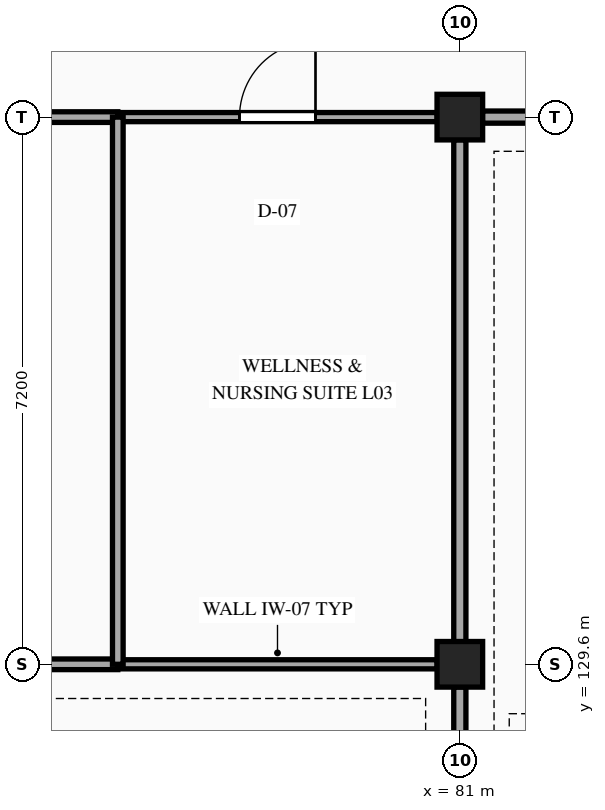
"""IFC4 building model, lengths in metres.
Left out: names, types, materials, properties, quantities, classifications, styles, units other than length and angle.
Written with IfcOpenShell. Run it as: python <this file> out.ifc"""

import sys

from ifc_helpers import new_model, si_unit, direction, frame, frame_2d, origin, origin_2d, place, context, subcontext, project, spatial, rectangle, extrude, element, fill, save


model = new_model("IFC4")
c1 = context("Model", 3, precision=1e-05, world=origin(), true_north=direction((0.0, 1.0)))
c2 = subcontext(c1, "Body", "Model", "MODEL_VIEW")
j1 = project(units=[si_unit("LENGTHUNIT", "METRE"), si_unit("PLANEANGLEUNIT", "RADIAN")], contexts=[c1])
p1 = place(None, origin())
s1 = spatial("IfcSite", under=j1, at=p1, CompositionType="ELEMENT")
p2 = place(p1, origin())
s2 = spatial("IfcBuilding", under=s1, at=p2, CompositionType="ELEMENT")
p3 = place(p2, frame((0.0, 0.0, 15.3)))
s3 = spatial("IfcBuildingStorey", under=s2, at=p3, CompositionType="ELEMENT", Elevation=15.3)
for number, where, z_axis, x_axis in (
    (1, (81.0, 129.6, 0.0), (0.0, 0.0, 1.0), (1.0, 0.0, 0.0)),
    (2, (81.0, 136.8, 0.0), (0.0, 0.0, 1.0), (1.0, 0.0, 0.0)),
):
    element("IfcColumn", number, at=place(p3, frame(where, z_axis=z_axis, x_axis=x_axis)), inside=s3, PredefinedType="COLUMN", context=c2, shape_type="SweptSolid", body=[
        extrude(rectangle(XDim=0.6, YDim=0.6, at=origin_2d()), origin(), (0.0, 0.0, 1.0), 4.5),
    ])
p4 = place(p3, frame((72.298, 129.6, 0.0), z_axis=(0.0, 0.0, 1.0), x_axis=(1.0, 0.0, 0.0)))
e3 = element("IfcWall", 3, at=p4, inside=s3, PredefinedType="PARTITIONING", context=c2, shape_type="SweptSolid", body=[
    extrude(rectangle(XDim=4.202, YDim=0.14, at=frame_2d((2.101, 0.0))), origin(), (0.0, 0.0, 1.0), 3.638),
])
p5 = place(p3, frame((76.5, 129.6, 0.0), z_axis=(0.0, 0.0, 1.0), x_axis=(1.0, 0.0, 0.0)))
e4 = element("IfcWall", 4, at=p5, inside=s3, PredefinedType="PARTITIONING", context=c2, shape_type="SweptSolid", body=[
    extrude(rectangle(XDim=4.202, YDim=0.12, at=frame_2d((2.101, 0.0))), origin(), (0.0, 0.0, 1.0), 3.638),
])
p6 = place(p3, frame((72.298, 136.8, 0.0), z_axis=(0.0, 0.0, 1.0), x_axis=(1.0, 0.0, 0.0)))
e5 = element("IfcWall", 5, at=p6, inside=s3, PredefinedType="PARTITIONING", context=c2, shape_type="SweptSolid", body=[
    extrude(rectangle(XDim=4.202, YDim=0.14, at=frame_2d((2.101, 0.0))), origin(), (0.0, 0.0, 1.0), 3.638),
])
p7 = place(p6, frame((1.626, 0.0, 0.0)))
e6 = element("IfcOpeningElement", 6, at=p7, cuts=e5, PredefinedType="OPENING", context=c2, shape_type="SweptSolid", body=[
    extrude(rectangle(XDim=0.95, YDim=2.1, at=frame_2d((0.475, 1.05))), frame((0.0, 0.08, 0.0), z_axis=(0.0, -1.0, 0.0), x_axis=(1.0, 0.0, 0.0)), (0.0, 0.0, 1.0), 0.16),
])
p8 = place(p3, frame((76.5, 136.8, 0.0), z_axis=(0.0, 0.0, 1.0), x_axis=(1.0, 0.0, 0.0)))
e7 = element("IfcWall", 7, at=p8, inside=s3, PredefinedType="PARTITIONING", context=c2, shape_type="SweptSolid", body=[
    extrude(rectangle(XDim=4.202, YDim=0.12, at=frame_2d((2.101, 0.0))), origin(), (0.0, 0.0, 1.0), 3.638),
])
p9 = place(p8, frame((1.601, 0.0, 0.0)))
e8 = element("IfcOpeningElement", 8, at=p9, cuts=e7, PredefinedType="OPENING", context=c2, shape_type="SweptSolid", body=[
    extrude(rectangle(XDim=1.0, YDim=2.15, at=frame_2d((0.5, 1.075))), frame((0.0, 0.07, 0.0), z_axis=(0.0, -1.0, 0.0), x_axis=(1.0, 0.0, 0.0)), (0.0, 0.0, 1.0), 0.14),
])
p10 = place(p3, frame((81.298, 136.8, 0.0), z_axis=(0.0, 0.0, 1.0), x_axis=(1.0, 0.0, 0.0)))
e9 = element("IfcWall", 9, at=p10, inside=s3, PredefinedType="PARTITIONING", context=c2, shape_type="SweptSolid", body=[
    extrude(rectangle(XDim=8.404, YDim=0.16, at=frame_2d((4.202, 0.0))), origin(), (0.0, 0.0, 1.0), 3.638),
])
p11 = place(p10, frame((3.302, 0.0, 0.0)))
e10 = element("IfcOpeningElement", 10, at=p11, cuts=e9, PredefinedType="OPENING", context=c2, shape_type="SweptSolid", body=[
    extrude(rectangle(XDim=1.8, YDim=2.25, at=frame_2d((0.9, 1.125))), frame((0.0, 0.09, 0.0), z_axis=(0.0, -1.0, 0.0), x_axis=(1.0, 0.0, 0.0)), (0.0, 0.0, 1.0), 0.18),
])
p12 = place(p3, frame((76.5, 129.6, 0.0), z_axis=(0.0, 0.0, 1.0), x_axis=(0.0, 1.0, 0.0)))
e11 = element("IfcWall", 11, at=p12, inside=s3, PredefinedType="PARTITIONING", context=c2, shape_type="SweptSolid", body=[
    extrude(rectangle(XDim=7.2, YDim=0.14, at=frame_2d((3.6, 0.0))), origin(), (0.0, 0.0, 1.0), 3.638),
])
for number, where, z_axis, x_axis in (
    (12, (81.0, 122.698, 0.0), (0.0, 0.0, 1.0), (0.0, 1.0, 0.0)),
    (13, (81.0, 129.898, 0.0), (0.0, 0.0, 1.0), (0.0, 1.0, 0.0)),
):
    element("IfcWall", number, at=place(p3, frame(where, z_axis=z_axis, x_axis=x_axis)), inside=s3, PredefinedType="PARTITIONING", context=c2, shape_type="SweptSolid", body=[
        extrude(rectangle(XDim=6.604, YDim=0.16, at=frame_2d((3.302, 0.0))), origin(), (0.0, 0.0, 1.0), 3.638),
    ])
p13 = place(p9, origin())
e14 = element("IfcDoor", 14, at=p13, inside=s3, OperationType="SINGLE_SWING_RIGHT", PredefinedType="DOOR", context=c2, shape_type="SweptSolid", body=[
    extrude(rectangle(XDim=1.0, YDim=2.15, at=frame_2d((0.5, 1.075))), frame((0.0, 0.025, 0.0), z_axis=(0.0, -1.0, 0.0), x_axis=(1.0, 0.0, 0.0)), (0.0, 0.0, 1.0), 0.05),
])
fill(e8, e14)
save(model, sys.argv[1])
